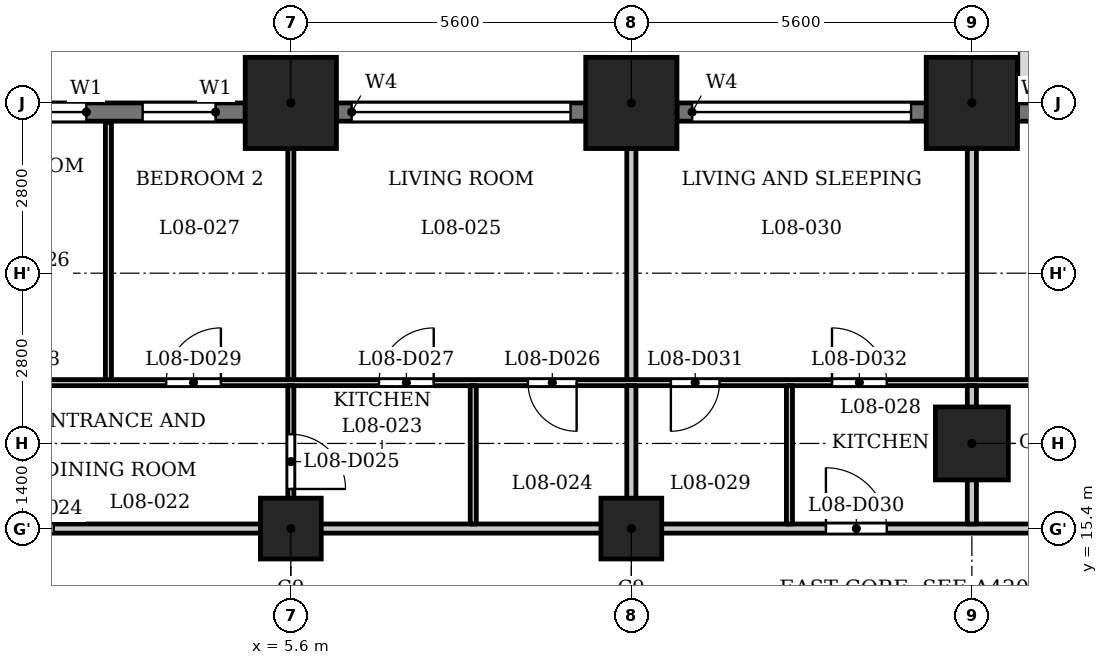
"""IFC4 building model, lengths in metres.
Left out: names, types, materials, properties, quantities, classifications, styles, units other than length and angle.
Written with IfcOpenShell. Run it as: python <this file> out.ifc"""

import sys

from ifc_helpers import new_model, si_unit, direction, frame, frame_2d, origin, origin_2d, place, context, subcontext, project, spatial, rectangle, extrude, element, fill, save


model = new_model("IFC4")
c1 = context("Model", 3, precision=1e-05, world=origin(), true_north=direction((0.0, 1.0)))
c2 = subcontext(c1, "Body", "Model", "MODEL_VIEW")
j1 = project(units=[si_unit("LENGTHUNIT", "METRE"), si_unit("PLANEANGLEUNIT", "RADIAN")], contexts=[c1])
p1 = place(None, origin())
s1 = spatial("IfcSite", under=j1, at=p1, CompositionType="ELEMENT")
p2 = place(p1, origin())
s2 = spatial("IfcBuilding", under=s1, at=p2, CompositionType="ELEMENT")
p3 = place(p2, frame((0.0, 0.0, 37.5)))
s3 = spatial("IfcBuildingStorey", under=s2, at=p3, CompositionType="ELEMENT", Elevation=37.5)
for number, where, z_axis, x_axis in (
    (1, (16.8, 22.4, 0.0), (0.0, 0.0, 1.0), (1.0, 0.0, 0.0)),
    (2, (11.2, 22.4, 0.0), (0.0, 0.0, 1.0), (1.0, 0.0, 0.0)),
    (3, (5.6, 22.4, 0.0), (0.0, 0.0, 1.0), (1.0, 0.0, 0.0)),
):
    element("IfcColumn", number, at=place(p3, frame(where, z_axis=z_axis, x_axis=x_axis)), inside=s3, PredefinedType="COLUMN", context=c2, shape_type="SweptSolid", body=[
        extrude(rectangle(XDim=1.5, YDim=1.5, at=origin_2d()), origin(), (0.0, 0.0, 1.0), 3.5),
    ])
p4 = place(p3, frame((16.8, 16.8, 0.0), z_axis=(0.0, 0.0, 1.0), x_axis=(1.0, 0.0, 0.0)))
e4 = element("IfcColumn", 4, at=p4, inside=s3, PredefinedType="COLUMN", context=c2, shape_type="SweptSolid", body=[
    extrude(rectangle(XDim=1.2, YDim=1.2, at=origin_2d()), origin(), (0.0, 0.0, 1.0), 3.5),
])
for number, where, z_axis, x_axis in (
    (5, (5.6, 15.4, 0.0), (0.0, 0.0, 1.0), (1.0, 0.0, 0.0)),
    (6, (11.2, 15.4, 0.0), (0.0, 0.0, 1.0), (1.0, 0.0, 0.0)),
):
    element("IfcColumn", number, at=place(p3, frame(where, z_axis=z_axis, x_axis=x_axis)), inside=s3, PredefinedType="COLUMN", context=c2, shape_type="SweptSolid", body=[
        extrude(rectangle(XDim=1.0, YDim=1.0, at=origin_2d()), origin(), (0.0, 0.0, 1.0), 3.5),
    ])
p5 = place(p3, frame((20.0, 22.25, 0.0), z_axis=(0.0, 0.0, 1.0), x_axis=(-1.0, 0.0, 0.0)))
e7 = element("IfcWall", 7, at=p5, inside=s3, PredefinedType="SOLIDWALL", context=c2, shape_type="SweptSolid", body=[
    extrude(rectangle(XDim=2.45, YDim=0.3, at=frame_2d((1.225, 0.0))), origin(), (0.0, 0.0, 1.0), 2.35),
])
p6 = place(p5, frame((0.325, 0.0, 0.9)))
e8 = element("IfcOpeningElement", 8, at=p6, cuts=e7, PredefinedType="OPENING", context=c2, shape_type="SweptSolid", body=[
    extrude(rectangle(XDim=1.8, YDim=1.25, at=frame_2d((0.9, 0.625))), frame((0.0, 0.16, 0.0), z_axis=(0.0, -1.0, 0.0), x_axis=(1.0, 0.0, 0.0)), (0.0, 0.0, 1.0), 0.32),
])
p7 = place(p3, frame((16.05, 22.25, 0.0), z_axis=(0.0, 0.0, 1.0), x_axis=(-1.0, 0.0, 0.0)))
e9 = element("IfcWall", 9, at=p7, inside=s3, PredefinedType="SOLIDWALL", context=c2, shape_type="SweptSolid", body=[
    extrude(rectangle(XDim=4.1, YDim=0.3, at=frame_2d((2.05, 0.0))), origin(), (0.0, 0.0, 1.0), 2.35),
])
p8 = place(p7, frame((0.25, 0.0, 1.2)))
e10 = element("IfcOpeningElement", 10, at=p8, cuts=e9, PredefinedType="OPENING", context=c2, shape_type="SweptSolid", body=[
    extrude(rectangle(XDim=3.6, YDim=0.95, at=frame_2d((1.8, 0.475))), frame((0.0, 0.16, 0.0), z_axis=(0.0, -1.0, 0.0), x_axis=(1.0, 0.0, 0.0)), (0.0, 0.0, 1.0), 0.32),
])
p9 = place(p3, frame((10.45, 22.25, 0.0), z_axis=(0.0, 0.0, 1.0), x_axis=(-1.0, 0.0, 0.0)))
e11 = element("IfcWall", 11, at=p9, inside=s3, PredefinedType="SOLIDWALL", context=c2, shape_type="SweptSolid", body=[
    extrude(rectangle(XDim=4.1, YDim=0.3, at=frame_2d((2.05, 0.0))), origin(), (0.0, 0.0, 1.0), 2.35),
])
p10 = place(p9, frame((0.25, 0.0, 1.2)))
e12 = element("IfcOpeningElement", 12, at=p10, cuts=e11, PredefinedType="OPENING", context=c2, shape_type="SweptSolid", body=[
    extrude(rectangle(XDim=3.6, YDim=0.95, at=frame_2d((1.8, 0.475))), frame((0.0, 0.16, 0.0), z_axis=(0.0, -1.0, 0.0), x_axis=(1.0, 0.0, 0.0)), (0.0, 0.0, 1.0), 0.32),
])
p11 = place(p3, frame((4.85, 22.25, 0.0), z_axis=(0.0, 0.0, 1.0), x_axis=(-1.0, 0.0, 0.0)))
e13 = element("IfcWall", 13, at=p11, inside=s3, PredefinedType="SOLIDWALL", context=c2, shape_type="SweptSolid", body=[
    extrude(rectangle(XDim=4.1, YDim=0.3, at=frame_2d((2.05, 0.0))), origin(), (0.0, 0.0, 1.0), 2.35),
])
p12 = place(p11, frame((0.488, 0.0, 0.6)))
e14 = element("IfcOpeningElement", 14, at=p12, cuts=e13, PredefinedType="OPENING", context=c2, shape_type="SweptSolid", body=[
    extrude(rectangle(XDim=1.2, YDim=1.55, at=frame_2d((0.6, 0.775))), frame((0.0, 0.16, 0.0), z_axis=(0.0, -1.0, 0.0), x_axis=(1.0, 0.0, 0.0)), (0.0, 0.0, 1.0), 0.32),
])
p13 = place(p11, frame((2.613, 0.0, 0.6)))
e15 = element("IfcOpeningElement", 15, at=p13, cuts=e13, PredefinedType="OPENING", context=c2, shape_type="SweptSolid", body=[
    extrude(rectangle(XDim=1.2, YDim=1.55, at=frame_2d((0.6, 0.775))), frame((0.0, 0.16, 0.0), z_axis=(0.0, -1.0, 0.0), x_axis=(1.0, 0.0, 0.0)), (0.0, 0.0, 1.0), 0.32),
])
p14 = place(p3, frame((-27.484, 15.4, 0.0), z_axis=(0.0, 0.0, 1.0), x_axis=(1.0, 0.0, 0.0)))
e16 = element("IfcWall", 16, at=p14, inside=s3, PredefinedType="PARTITIONING", context=c2, shape_type="SweptSolid", body=[
    extrude(rectangle(XDim=54.968, YDim=0.15, at=frame_2d((27.484, 0.0))), origin(), (0.0, 0.0, 1.0), 3.2),
])
p15 = place(p14, frame((8.784, 0.0, 0.0)))
e17 = element("IfcOpeningElement", 17, at=p15, cuts=e16, PredefinedType="OPENING", context=c2, shape_type="SweptSolid", body=[
    extrude(rectangle(XDim=1.0, YDim=2.1, at=frame_2d((0.5, 1.05))), frame((0.0, 0.085, 0.0), z_axis=(0.0, -1.0, 0.0), x_axis=(1.0, 0.0, 0.0)), (0.0, 0.0, 1.0), 0.17),
])
p16 = place(p14, frame((14.634, 0.0, 0.0)))
e18 = element("IfcOpeningElement", 18, at=p16, cuts=e16, PredefinedType="OPENING", context=c2, shape_type="SweptSolid", body=[
    extrude(rectangle(XDim=1.0, YDim=2.1, at=frame_2d((0.5, 1.05))), frame((0.0, 0.085, 0.0), z_axis=(0.0, -1.0, 0.0), x_axis=(1.0, 0.0, 0.0)), (0.0, 0.0, 1.0), 0.17),
])
p17 = place(p14, frame((23.834, 0.0, 0.0)))
e19 = element("IfcOpeningElement", 19, at=p17, cuts=e16, PredefinedType="OPENING", context=c2, shape_type="SweptSolid", body=[
    extrude(rectangle(XDim=1.0, YDim=2.1, at=frame_2d((0.5, 1.05))), frame((0.0, 0.085, 0.0), z_axis=(0.0, -1.0, 0.0), x_axis=(1.0, 0.0, 0.0)), (0.0, 0.0, 1.0), 0.17),
])
p18 = place(p14, frame((28.184, 0.0, 0.0)))
e20 = element("IfcOpeningElement", 20, at=p18, cuts=e16, PredefinedType="OPENING", context=c2, shape_type="SweptSolid", body=[
    extrude(rectangle(XDim=1.0, YDim=2.1, at=frame_2d((0.5, 1.05))), frame((0.0, 0.085, 0.0), z_axis=(0.0, -1.0, 0.0), x_axis=(1.0, 0.0, 0.0)), (0.0, 0.0, 1.0), 0.17),
])
p19 = place(p14, frame((41.884, 0.0, 0.0)))
e21 = element("IfcOpeningElement", 21, at=p19, cuts=e16, PredefinedType="OPENING", context=c2, shape_type="SweptSolid", body=[
    extrude(rectangle(XDim=1.0, YDim=2.1, at=frame_2d((0.5, 1.05))), frame((0.0, 0.085, 0.0), z_axis=(0.0, -1.0, 0.0), x_axis=(1.0, 0.0, 0.0)), (0.0, 0.0, 1.0), 0.17),
])
p20 = place(p14, frame((48.234, 0.0, 0.0)))
e22 = element("IfcOpeningElement", 22, at=p20, cuts=e16, PredefinedType="OPENING", context=c2, shape_type="SweptSolid", body=[
    extrude(rectangle(XDim=1.0, YDim=2.1, at=frame_2d((0.5, 1.05))), frame((0.0, 0.085, 0.0), z_axis=(0.0, -1.0, 0.0), x_axis=(1.0, 0.0, 0.0)), (0.0, 0.0, 1.0), 0.17),
])
p21 = place(p3, frame((-26.732, 17.8, 0.0), z_axis=(0.0, 0.0, 1.0), x_axis=(1.0, 0.0, 0.0)))
e23 = element("IfcWall", 23, at=p21, inside=s3, PredefinedType="PARTITIONING", context=c2, shape_type="SweptSolid", body=[
    extrude(rectangle(XDim=53.126, YDim=0.1, at=frame_2d((26.563, 0.0))), origin(), (0.0, 0.0, 1.0), 3.2),
])
p22 = place(p21, frame((2.964, 0.0, 0.0)))
e24 = element("IfcOpeningElement", 24, at=p22, cuts=e23, PredefinedType="OPENING", context=c2, shape_type="SweptSolid", body=[
    extrude(rectangle(XDim=0.8, YDim=2.1, at=frame_2d((0.4, 1.05))), frame((0.0, 0.06, 0.0), z_axis=(0.0, -1.0, 0.0), x_axis=(1.0, 0.0, 0.0)), (0.0, 0.0, 1.0), 0.12),
])
p23 = place(p21, frame((7.132, 0.0, 0.0)))
e25 = element("IfcOpeningElement", 25, at=p23, cuts=e23, PredefinedType="OPENING", context=c2, shape_type="SweptSolid", body=[
    extrude(rectangle(XDim=0.9, YDim=2.1, at=frame_2d((0.45, 1.05))), frame((0.0, 0.06, 0.0), z_axis=(0.0, -1.0, 0.0), x_axis=(1.0, 0.0, 0.0)), (0.0, 0.0, 1.0), 0.12),
])
p24 = place(p21, frame((19.432, 0.0, 0.0)))
e26 = element("IfcOpeningElement", 26, at=p24, cuts=e23, PredefinedType="OPENING", context=c2, shape_type="SweptSolid", body=[
    extrude(rectangle(XDim=0.8, YDim=2.1, at=frame_2d((0.4, 1.05))), frame((0.0, 0.06, 0.0), z_axis=(0.0, -1.0, 0.0), x_axis=(1.0, 0.0, 0.0)), (0.0, 0.0, 1.0), 0.12),
])
p25 = place(p21, frame((16.732, 0.0, 0.0)))
e27 = element("IfcOpeningElement", 27, at=p25, cuts=e23, PredefinedType="OPENING", context=c2, shape_type="SweptSolid", body=[
    extrude(rectangle(XDim=0.9, YDim=2.1, at=frame_2d((0.45, 1.05))), frame((0.0, 0.06, 0.0), z_axis=(0.0, -1.0, 0.0), x_axis=(1.0, 0.0, 0.0)), (0.0, 0.0, 1.0), 0.12),
])
p26 = place(p21, frame((10.982, 0.0, 0.0)))
e28 = element("IfcOpeningElement", 28, at=p26, cuts=e23, PredefinedType="OPENING", context=c2, shape_type="SweptSolid", body=[
    extrude(rectangle(XDim=0.9, YDim=2.1, at=frame_2d((0.45, 1.05))), frame((0.0, 0.06, 0.0), z_axis=(0.0, -1.0, 0.0), x_axis=(1.0, 0.0, 0.0)), (0.0, 0.0, 1.0), 0.12),
])
p27 = place(p21, frame((12.982, 0.0, 0.0)))
e29 = element("IfcOpeningElement", 29, at=p27, cuts=e23, PredefinedType="OPENING", context=c2, shape_type="SweptSolid", body=[
    extrude(rectangle(XDim=0.9, YDim=2.1, at=frame_2d((0.45, 1.05))), frame((0.0, 0.06, 0.0), z_axis=(0.0, -1.0, 0.0), x_axis=(1.0, 0.0, 0.0)), (0.0, 0.0, 1.0), 0.12),
])
p28 = place(p21, frame((25.382, 0.0, 0.0)))
e30 = element("IfcOpeningElement", 30, at=p28, cuts=e23, PredefinedType="OPENING", context=c2, shape_type="SweptSolid", body=[
    extrude(rectangle(XDim=0.8, YDim=2.1, at=frame_2d((0.4, 1.05))), frame((0.0, 0.06, 0.0), z_axis=(0.0, -1.0, 0.0), x_axis=(1.0, 0.0, 0.0)), (0.0, 0.0, 1.0), 0.12),
])
p29 = place(p21, frame((22.182, 0.0, 0.0)))
e31 = element("IfcOpeningElement", 31, at=p29, cuts=e23, PredefinedType="OPENING", context=c2, shape_type="SweptSolid", body=[
    extrude(rectangle(XDim=0.9, YDim=2.1, at=frame_2d((0.45, 1.05))), frame((0.0, 0.06, 0.0), z_axis=(0.0, -1.0, 0.0), x_axis=(1.0, 0.0, 0.0)), (0.0, 0.0, 1.0), 0.12),
])
p30 = place(p21, frame((36.232, 0.0, 0.0)))
e32 = element("IfcOpeningElement", 32, at=p30, cuts=e23, PredefinedType="OPENING", context=c2, shape_type="SweptSolid", body=[
    extrude(rectangle(XDim=0.8, YDim=2.1, at=frame_2d((0.4, 1.05))), frame((0.0, 0.06, 0.0), z_axis=(0.0, -1.0, 0.0), x_axis=(1.0, 0.0, 0.0)), (0.0, 0.0, 1.0), 0.12),
])
p31 = place(p21, frame((33.782, 0.0, 0.0)))
e33 = element("IfcOpeningElement", 33, at=p31, cuts=e23, PredefinedType="OPENING", context=c2, shape_type="SweptSolid", body=[
    extrude(rectangle(XDim=0.9, YDim=2.1, at=frame_2d((0.45, 1.05))), frame((0.0, 0.06, 0.0), z_axis=(0.0, -1.0, 0.0), x_axis=(1.0, 0.0, 0.0)), (0.0, 0.0, 1.0), 0.12),
])
p32 = place(p21, frame((27.282, 0.0, 0.0)))
e34 = element("IfcOpeningElement", 34, at=p32, cuts=e23, PredefinedType="OPENING", context=c2, shape_type="SweptSolid", body=[
    extrude(rectangle(XDim=0.9, YDim=2.1, at=frame_2d((0.45, 1.05))), frame((0.0, 0.06, 0.0), z_axis=(0.0, -1.0, 0.0), x_axis=(1.0, 0.0, 0.0)), (0.0, 0.0, 1.0), 0.12),
])
p33 = place(p21, frame((30.282, 0.0, 0.0)))
e35 = element("IfcOpeningElement", 35, at=p33, cuts=e23, PredefinedType="OPENING", context=c2, shape_type="SweptSolid", body=[
    extrude(rectangle(XDim=0.9, YDim=2.1, at=frame_2d((0.45, 1.05))), frame((0.0, 0.06, 0.0), z_axis=(0.0, -1.0, 0.0), x_axis=(1.0, 0.0, 0.0)), (0.0, 0.0, 1.0), 0.12),
])
p34 = place(p21, frame((38.582, 0.0, 0.0)))
e36 = element("IfcOpeningElement", 36, at=p34, cuts=e23, PredefinedType="OPENING", context=c2, shape_type="SweptSolid", body=[
    extrude(rectangle(XDim=0.8, YDim=2.1, at=frame_2d((0.4, 1.05))), frame((0.0, 0.06, 0.0), z_axis=(0.0, -1.0, 0.0), x_axis=(1.0, 0.0, 0.0)), (0.0, 0.0, 1.0), 0.12),
])
p35 = place(p21, frame((41.232, 0.0, 0.0)))
e37 = element("IfcOpeningElement", 37, at=p35, cuts=e23, PredefinedType="OPENING", context=c2, shape_type="SweptSolid", body=[
    extrude(rectangle(XDim=0.9, YDim=2.1, at=frame_2d((0.45, 1.05))), frame((0.0, 0.06, 0.0), z_axis=(0.0, -1.0, 0.0), x_axis=(1.0, 0.0, 0.0)), (0.0, 0.0, 1.0), 0.12),
])
p36 = place(p21, frame((51.532, 0.0, 0.0)))
e38 = element("IfcOpeningElement", 38, at=p36, cuts=e23, PredefinedType="OPENING", context=c2, shape_type="SweptSolid", body=[
    extrude(rectangle(XDim=0.8, YDim=2.1, at=frame_2d((0.4, 1.05))), frame((0.0, 0.06, 0.0), z_axis=(0.0, -1.0, 0.0), x_axis=(1.0, 0.0, 0.0)), (0.0, 0.0, 1.0), 0.12),
])
p37 = place(p21, frame((46.582, 0.0, 0.0)))
e39 = element("IfcOpeningElement", 39, at=p37, cuts=e23, PredefinedType="OPENING", context=c2, shape_type="SweptSolid", body=[
    extrude(rectangle(XDim=0.9, YDim=2.1, at=frame_2d((0.45, 1.05))), frame((0.0, 0.06, 0.0), z_axis=(0.0, -1.0, 0.0), x_axis=(1.0, 0.0, 0.0)), (0.0, 0.0, 1.0), 0.12),
])
p38 = place(p3, frame((2.6, 17.85, 0.0), z_axis=(0.0, 0.0, 1.0), x_axis=(0.0, 1.0, 0.0)))
e40 = element("IfcWall", 40, at=p38, inside=s3, PredefinedType="PARTITIONING", context=c2, shape_type="SweptSolid", body=[
    extrude(rectangle(XDim=4.23, YDim=0.1, at=frame_2d((2.115, 0.0))), origin(), (0.0, 0.0, 1.0), 3.2),
])
p39 = place(p3, frame((5.6, 15.475, 0.0), z_axis=(0.0, 0.0, 1.0), x_axis=(0.0, 1.0, 0.0)))
e41 = element("IfcWall", 41, at=p39, inside=s3, PredefinedType="PARTITIONING", context=c2, shape_type="SweptSolid", body=[
    extrude(rectangle(XDim=2.275, YDim=0.1, at=frame_2d((1.137, 0.0))), origin(), (0.0, 0.0, 1.0), 3.2),
])
p40 = place(p39, frame((0.576, 0.0, 0.0)))
e42 = element("IfcOpeningElement", 42, at=p40, cuts=e41, PredefinedType="OPENING", context=c2, shape_type="SweptSolid", body=[
    extrude(rectangle(XDim=0.9, YDim=2.1, at=frame_2d((0.45, 1.05))), frame((0.0, 0.06, 0.0), z_axis=(0.0, -1.0, 0.0), x_axis=(1.0, 0.0, 0.0)), (0.0, 0.0, 1.0), 0.12),
])
p41 = place(p3, frame((5.6, 17.85, 0.0), z_axis=(0.0, 0.0, 1.0), x_axis=(0.0, 1.0, 0.0)))
e43 = element("IfcWall", 43, at=p41, inside=s3, PredefinedType="PARTITIONING", context=c2, shape_type="SweptSolid", body=[
    extrude(rectangle(XDim=5.28, YDim=0.1, at=frame_2d((2.64, 0.0))), origin(), (0.0, 0.0, 1.0), 3.2),
])
p42 = place(p3, frame((8.6, 15.475, 0.0), z_axis=(0.0, 0.0, 1.0), x_axis=(0.0, 1.0, 0.0)))
e44 = element("IfcWall", 44, at=p42, inside=s3, PredefinedType="PARTITIONING", context=c2, shape_type="SweptSolid", body=[
    extrude(rectangle(XDim=2.275, YDim=0.1, at=frame_2d((1.137, 0.0))), origin(), (0.0, 0.0, 1.0), 3.2),
])
p43 = place(p3, frame((11.2, 15.475, 0.0), z_axis=(0.0, 0.0, 1.0), x_axis=(0.0, 1.0, 0.0)))
e45 = element("IfcWall", 45, at=p43, inside=s3, PredefinedType="PARTITIONING", context=c2, shape_type="SweptSolid", body=[
    extrude(rectangle(XDim=2.275, YDim=0.15, at=frame_2d((1.137, 0.0))), origin(), (0.0, 0.0, 1.0), 3.2),
])
p44 = place(p3, frame((11.2, 17.85, 0.0), z_axis=(0.0, 0.0, 1.0), x_axis=(0.0, 1.0, 0.0)))
e46 = element("IfcWall", 46, at=p44, inside=s3, PredefinedType="PARTITIONING", context=c2, shape_type="SweptSolid", body=[
    extrude(rectangle(XDim=5.28, YDim=0.15, at=frame_2d((2.64, 0.0))), origin(), (0.0, 0.0, 1.0), 3.2),
])
p45 = place(p3, frame((13.8, 15.475, 0.0), z_axis=(0.0, 0.0, 1.0), x_axis=(0.0, 1.0, 0.0)))
e47 = element("IfcWall", 47, at=p45, inside=s3, PredefinedType="PARTITIONING", context=c2, shape_type="SweptSolid", body=[
    extrude(rectangle(XDim=2.275, YDim=0.1, at=frame_2d((1.137, 0.0))), origin(), (0.0, 0.0, 1.0), 3.2),
])
p46 = place(p3, frame((16.8, 15.475, 0.0), z_axis=(0.0, 0.0, 1.0), x_axis=(0.0, 1.0, 0.0)))
e48 = element("IfcWall", 48, at=p46, inside=s3, PredefinedType="PARTITIONING", context=c2, shape_type="SweptSolid", body=[
    extrude(rectangle(XDim=2.275, YDim=0.15, at=frame_2d((1.137, 0.0))), origin(), (0.0, 0.0, 1.0), 3.2),
])
p47 = place(p3, frame((16.8, 17.85, 0.0), z_axis=(0.0, 0.0, 1.0), x_axis=(0.0, 1.0, 0.0)))
e49 = element("IfcWall", 49, at=p47, inside=s3, PredefinedType="PARTITIONING", context=c2, shape_type="SweptSolid", body=[
    extrude(rectangle(XDim=5.28, YDim=0.15, at=frame_2d((2.64, 0.0))), origin(), (0.0, 0.0, 1.0), 3.2),
])
p48 = place(p18, origin())
e50 = element("IfcDoor", 50, at=p48, inside=s3, OperationType="SINGLE_SWING_RIGHT", PredefinedType="DOOR", context=c2, shape_type="SweptSolid", body=[
    extrude(rectangle(XDim=1.0, YDim=2.1, at=frame_2d((0.5, 1.05))), frame((0.0, 0.025, 0.0), z_axis=(0.0, -1.0, 0.0), x_axis=(1.0, 0.0, 0.0)), (0.0, 0.0, 1.0), 0.05),
])
fill(e20, e50)
p49 = place(p40, origin())
e51 = element("IfcDoor", 51, at=p49, inside=s3, OperationType="SINGLE_SWING_LEFT", PredefinedType="DOOR", context=c2, shape_type="SweptSolid", body=[
    extrude(rectangle(XDim=0.9, YDim=2.1, at=frame_2d((0.45, 1.05))), frame((0.0, 0.025, 0.0), z_axis=(0.0, -1.0, 0.0), x_axis=(1.0, 0.0, 0.0)), (0.0, 0.0, 1.0), 0.05),
])
fill(e42, e51)
p50 = place(p30, origin())
e52 = element("IfcDoor", 52, at=p50, inside=s3, OperationType="SINGLE_SWING_RIGHT", PredefinedType="DOOR", context=c2, shape_type="SweptSolid", body=[
    extrude(rectangle(XDim=0.8, YDim=2.1, at=frame_2d((0.4, 1.05))), frame((0.0, 0.025, 0.0), z_axis=(0.0, -1.0, 0.0), x_axis=(1.0, 0.0, 0.0)), (0.0, 0.0, 1.0), 0.05),
])
fill(e32, e52)
p51 = place(p31, origin())
e53 = element("IfcDoor", 53, at=p51, inside=s3, OperationType="SINGLE_SWING_LEFT", PredefinedType="DOOR", context=c2, shape_type="SweptSolid", body=[
    extrude(rectangle(XDim=0.9, YDim=2.1, at=frame_2d((0.45, 1.05))), frame((0.0, 0.025, 0.0), z_axis=(0.0, -1.0, 0.0), x_axis=(1.0, 0.0, 0.0)), (0.0, 0.0, 1.0), 0.05),
])
fill(e33, e53)
p52 = place(p33, origin())
e54 = element("IfcDoor", 54, at=p52, inside=s3, OperationType="SINGLE_SWING_LEFT", PredefinedType="DOOR", context=c2, shape_type="SweptSolid", body=[
    extrude(rectangle(XDim=0.9, YDim=2.1, at=frame_2d((0.45, 1.05))), frame((0.0, 0.025, 0.0), z_axis=(0.0, -1.0, 0.0), x_axis=(1.0, 0.0, 0.0)), (0.0, 0.0, 1.0), 0.05),
])
fill(e35, e54)
p53 = place(p19, origin())
e55 = element("IfcDoor", 55, at=p53, inside=s3, OperationType="SINGLE_SWING_RIGHT", PredefinedType="DOOR", context=c2, shape_type="SweptSolid", body=[
    extrude(rectangle(XDim=1.0, YDim=2.1, at=frame_2d((0.5, 1.05))), frame((0.0, 0.025, 0.0), z_axis=(0.0, -1.0, 0.0), x_axis=(1.0, 0.0, 0.0)), (0.0, 0.0, 1.0), 0.05),
])
fill(e21, e55)
p54 = place(p34, origin())
e56 = element("IfcDoor", 56, at=p54, inside=s3, OperationType="SINGLE_SWING_LEFT", PredefinedType="DOOR", context=c2, shape_type="SweptSolid", body=[
    extrude(rectangle(XDim=0.8, YDim=2.1, at=frame_2d((0.4, 1.05))), frame((0.0, 0.025, 0.0), z_axis=(0.0, -1.0, 0.0), x_axis=(1.0, 0.0, 0.0)), (0.0, 0.0, 1.0), 0.05),
])
fill(e36, e56)
p55 = place(p35, origin())
e57 = element("IfcDoor", 57, at=p55, inside=s3, OperationType="SINGLE_SWING_RIGHT", PredefinedType="DOOR", context=c2, shape_type="SweptSolid", body=[
    extrude(rectangle(XDim=0.9, YDim=2.1, at=frame_2d((0.45, 1.05))), frame((0.0, 0.025, 0.0), z_axis=(0.0, -1.0, 0.0), x_axis=(1.0, 0.0, 0.0)), (0.0, 0.0, 1.0), 0.05),
])
fill(e37, e57)
p56 = place(p8, origin())
e58 = element("IfcWindow", 58, at=p56, inside=s3, PartitioningType="SINGLE_PANEL", PredefinedType="WINDOW", context=c2, shape_type="SweptSolid", body=[
    extrude(rectangle(XDim=3.6, YDim=0.95, at=frame_2d((1.8, 0.475))), frame((0.0, 0.03, 0.0), z_axis=(0.0, -1.0, 0.0), x_axis=(1.0, 0.0, 0.0)), (0.0, 0.0, 1.0), 0.06),
])
fill(e10, e58)
p57 = place(p10, origin())
e59 = element("IfcWindow", 59, at=p57, inside=s3, PartitioningType="SINGLE_PANEL", PredefinedType="WINDOW", context=c2, shape_type="SweptSolid", body=[
    extrude(rectangle(XDim=3.6, YDim=0.95, at=frame_2d((1.8, 0.475))), frame((0.0, 0.03, 0.0), z_axis=(0.0, -1.0, 0.0), x_axis=(1.0, 0.0, 0.0)), (0.0, 0.0, 1.0), 0.06),
])
fill(e12, e59)
p58 = place(p12, origin())
e60 = element("IfcWindow", 60, at=p58, inside=s3, PartitioningType="SINGLE_PANEL", PredefinedType="WINDOW", context=c2, shape_type="SweptSolid", body=[
    extrude(rectangle(XDim=1.2, YDim=1.55, at=frame_2d((0.6, 0.775))), frame((0.0, 0.03, 0.0), z_axis=(0.0, -1.0, 0.0), x_axis=(1.0, 0.0, 0.0)), (0.0, 0.0, 1.0), 0.06),
])
fill(e14, e60)
p59 = place(p13, origin())
e61 = element("IfcWindow", 61, at=p59, inside=s3, PartitioningType="SINGLE_PANEL", PredefinedType="WINDOW", context=c2, shape_type="SweptSolid", body=[
    extrude(rectangle(XDim=1.2, YDim=1.55, at=frame_2d((0.6, 0.775))), frame((0.0, 0.03, 0.0), z_axis=(0.0, -1.0, 0.0), x_axis=(1.0, 0.0, 0.0)), (0.0, 0.0, 1.0), 0.06),
])
fill(e15, e61)
save(model, sys.argv[1])
